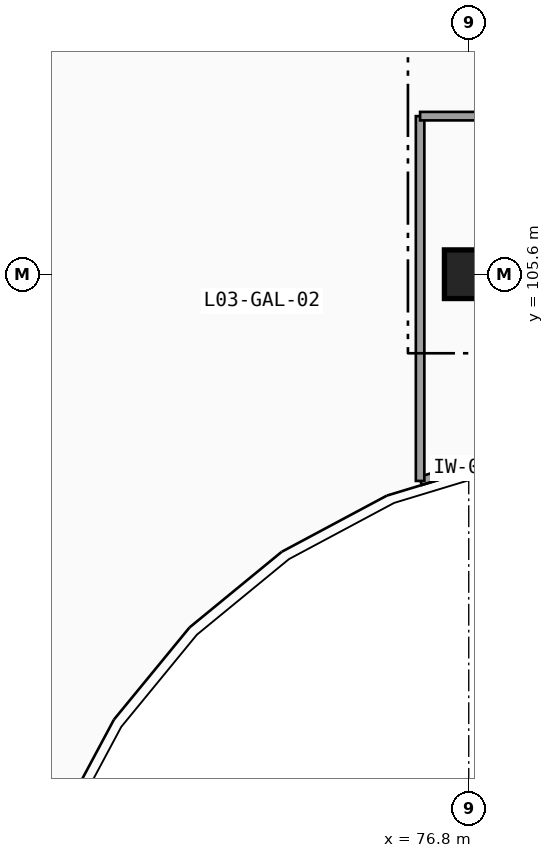
"""IFC4 building model, lengths in metres.
Left out: names, types, materials, properties, quantities, classifications, styles, units other than length and angle.
Written with IfcOpenShell. Run it as: python <this file> out.ifc"""

import sys

from ifc_helpers import new_model, si_unit, direction, frame, frame_2d, origin, origin_2d, place, context, subcontext, project, spatial, rectangle, extrude, element, save


model = new_model("IFC4")
c1 = context("Model", 3, precision=1e-05, world=origin(), true_north=direction((0.0, 1.0)))
c2 = subcontext(c1, "Body", "Model", "MODEL_VIEW")
j1 = project(units=[si_unit("LENGTHUNIT", "METRE"), si_unit("PLANEANGLEUNIT", "RADIAN")], contexts=[c1])
p1 = place(None, origin())
s1 = spatial("IfcSite", under=j1, at=p1, CompositionType="ELEMENT")
p2 = place(p1, origin())
s2 = spatial("IfcBuilding", under=s1, at=p2, CompositionType="ELEMENT")
p3 = place(p2, frame((0.0, 0.0, 14.1)))
s3 = spatial("IfcBuildingStorey", under=s2, at=p3, CompositionType="ELEMENT", Elevation=14.1)
p4 = place(p3, frame((76.8, 105.6, 0.0), z_axis=(0.0, 0.0, 1.0), x_axis=(1.0, 0.0, 0.0)))
e1 = element("IfcColumn", 1, at=p4, inside=s3, PredefinedType="COLUMN", context=c2, shape_type="SweptSolid", body=[
    extrude(rectangle(XDim=0.8, YDim=0.8, at=origin_2d()), origin(), (0.0, 0.0, 1.0), 4.5),
])
p5 = place(p3, frame((77.385, 102.618, 0.0), z_axis=(0.0, 0.0, 1.0), x_axis=(-0.956921766266, -0.290345885534, 0.0)))
e2 = element("IfcWall", 2, at=p5, inside=s3, PredefinedType="PARTITIONING", context=c2, shape_type="SweptSolid", body=[
    extrude(rectangle(XDim=1.441, YDim=0.14, at=frame_2d((0.721, 0.0))), origin(), (0.0, 0.0, 1.0), 4.24),
])
p6 = place(p3, frame((76.0, 102.2, 0.0), z_axis=(0.0, 0.0, 1.0), x_axis=(0.0, 1.0, 0.0)))
e3 = element("IfcWall", 3, at=p6, inside=s3, PredefinedType="PARTITIONING", context=c2, shape_type="SweptSolid", body=[
    extrude(rectangle(XDim=6.0, YDim=0.14, at=frame_2d((3.0, 0.0))), origin(), (0.0, 0.0, 1.0), 3.556),
])
p7 = place(p3, frame((76.0, 108.2, 0.0), z_axis=(0.0, 0.0, 1.0), x_axis=(1.0, 0.0, 0.0)))
e4 = element("IfcWall", 4, at=p7, inside=s3, PredefinedType="PARTITIONING", context=c2, shape_type="SweptSolid", body=[
    extrude(rectangle(XDim=2.35, YDim=0.14, at=frame_2d((1.175, 0.0))), origin(), (0.0, 0.0, 1.0), 3.638),
])
save(model, sys.argv[1])
